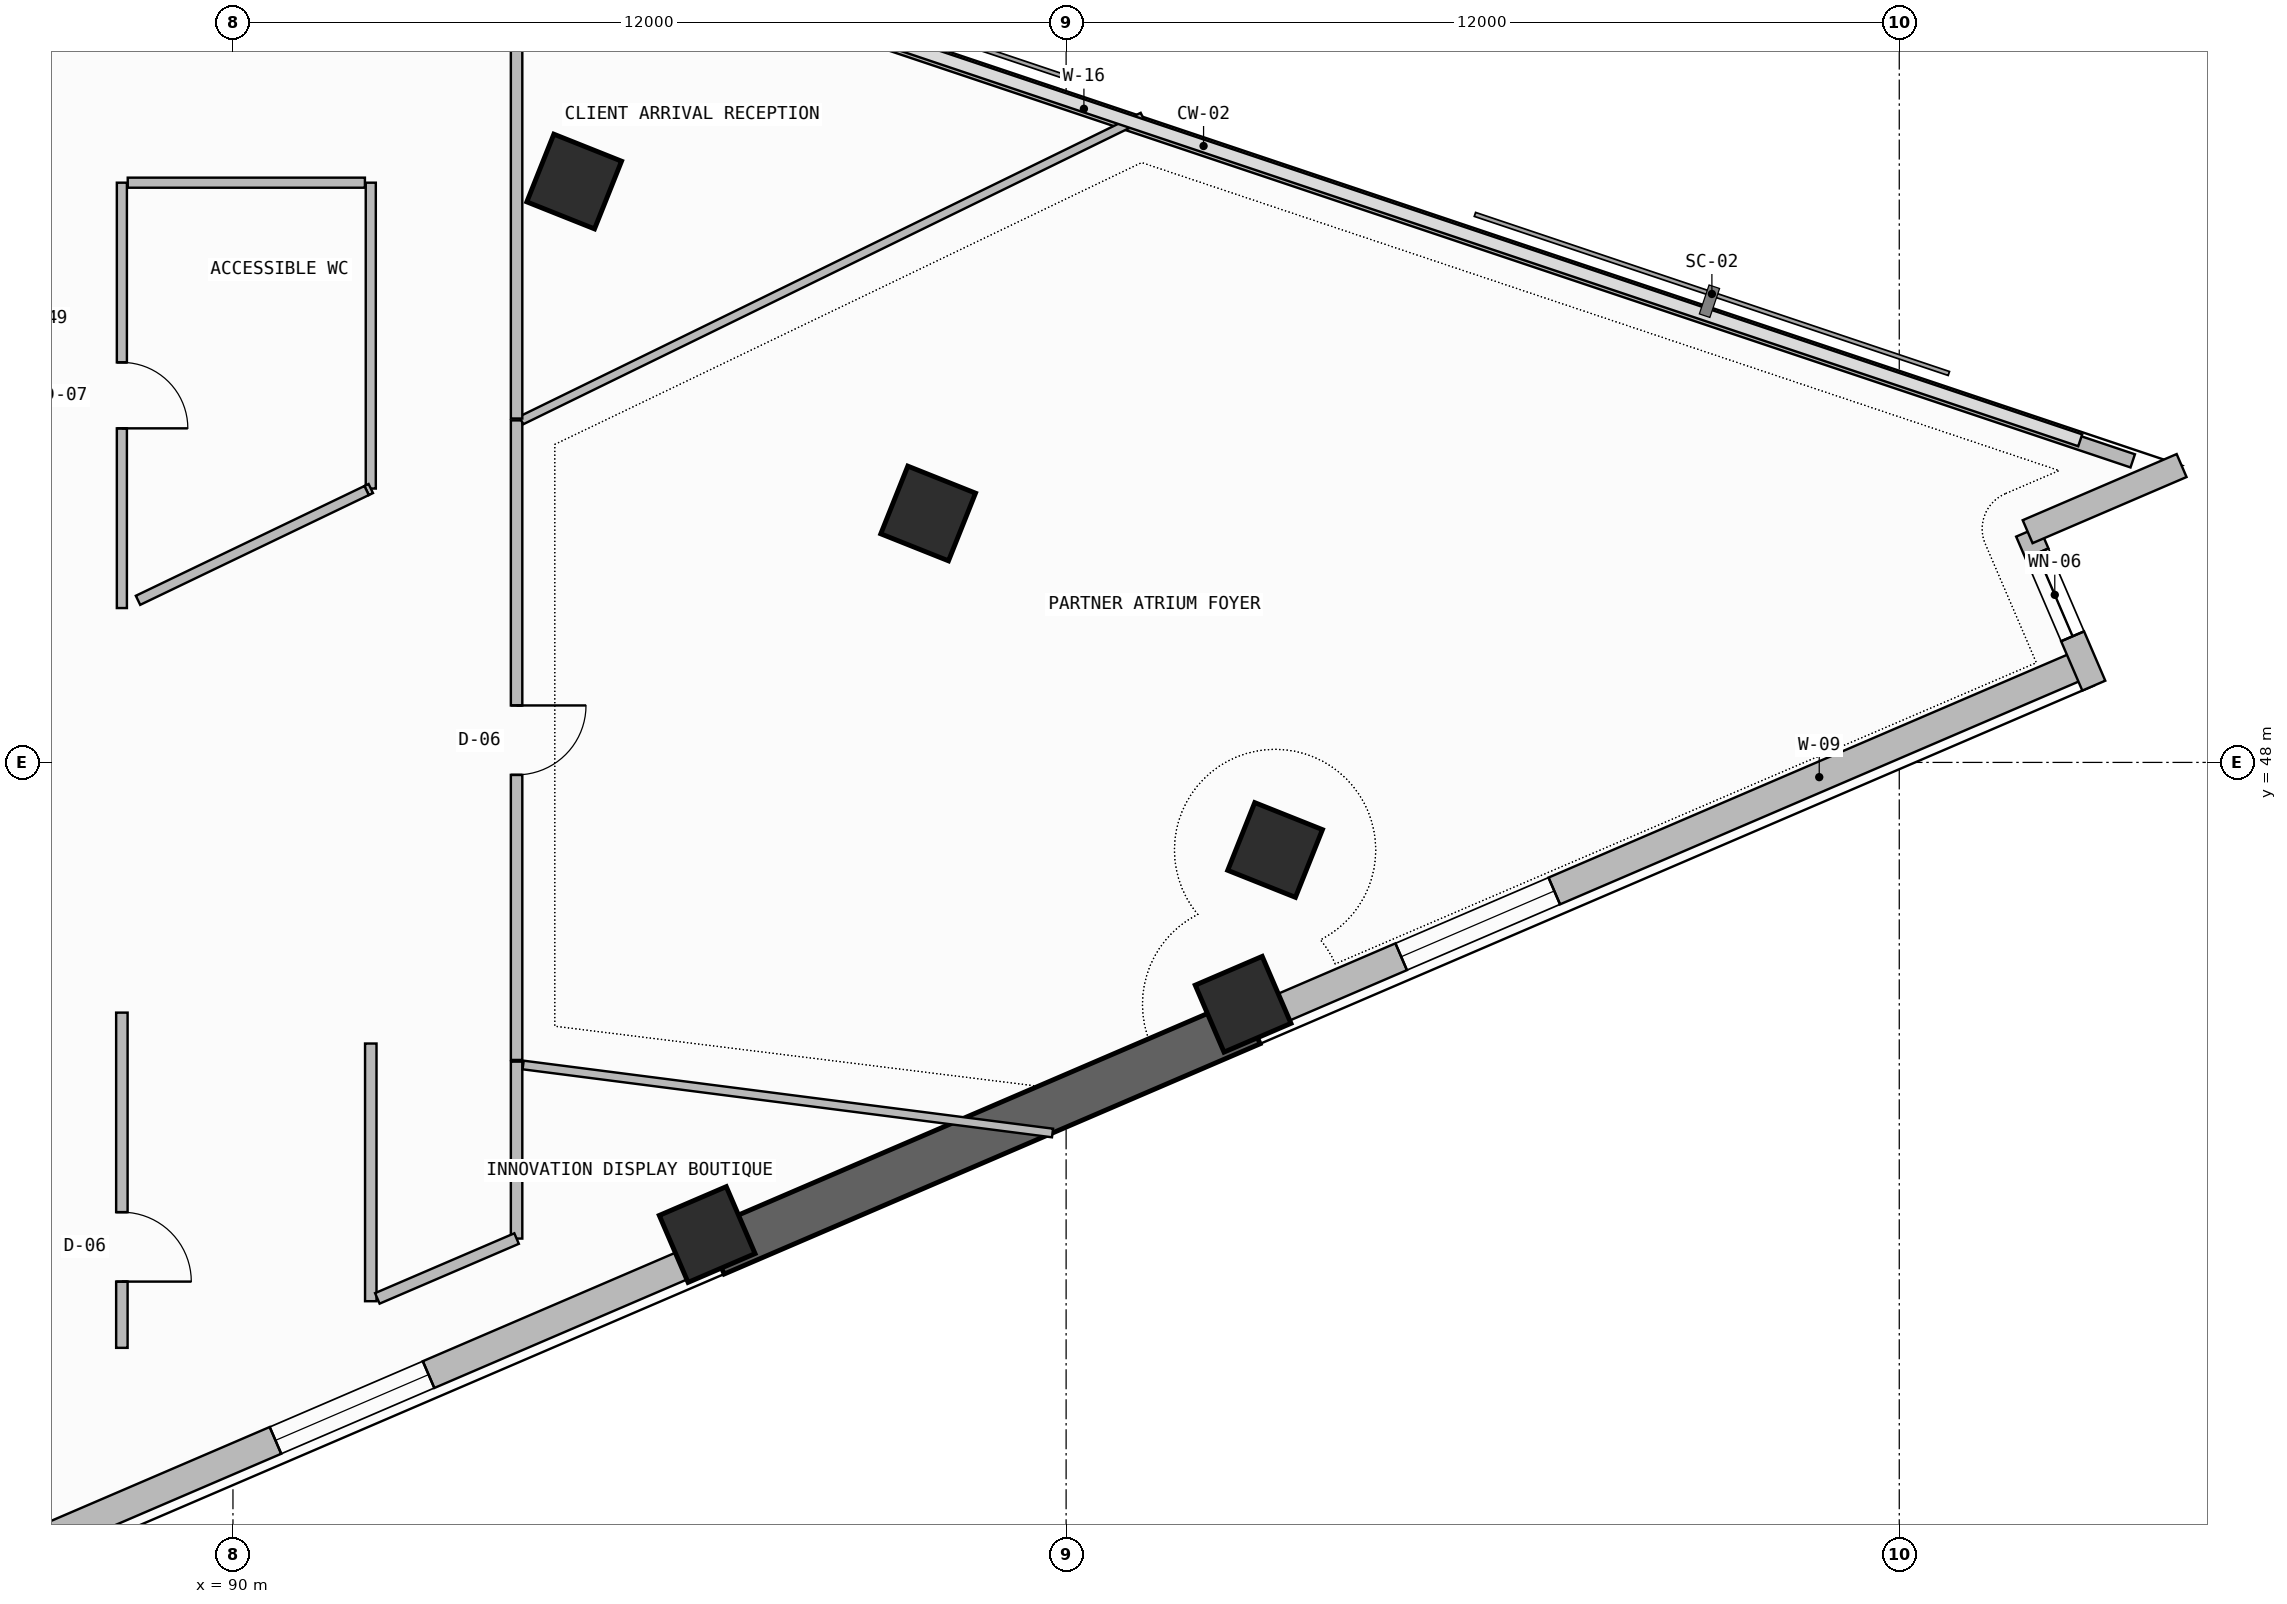
"""IFC4 building model, lengths in metres.
Left out: names, types, materials, properties, quantities, classifications, styles, units other than length and angle.
Written with IfcOpenShell. Run it as: python <this file> out.ifc"""

import sys

from ifc_helpers import new_model, si_unit, direction, frame, frame_2d, origin, origin_2d, place, context, subcontext, project, spatial, rectangle, extrude, element, fill, save


model = new_model("IFC4")
c1 = context("Model", 3, precision=1e-05, world=origin(), true_north=direction((0.0, 1.0)))
c2 = subcontext(c1, "Body", "Model", "MODEL_VIEW")
j1 = project(units=[si_unit("LENGTHUNIT", "METRE"), si_unit("PLANEANGLEUNIT", "RADIAN")], contexts=[c1])
p1 = place(None, origin())
s1 = spatial("IfcSite", under=j1, at=p1, CompositionType="ELEMENT")
p2 = place(p1, origin())
s2 = spatial("IfcBuilding", under=s1, at=p2, CompositionType="ELEMENT")
p3 = place(p2, frame((0.0, 0.0, 175.5)))
s3 = spatial("IfcBuildingStorey", under=s2, at=p3, CompositionType="ELEMENT", Elevation=175.5)
for number, where, z_axis, x_axis in (
    (1, (96.83, 41.2, 0.0), (0.0, 0.0, 1.0), (0.919, 0.395, 0.0)),
    (2, (104.549, 44.517, 0.0), (0.0, 0.0, 1.0), (0.919, 0.395, 0.0)),
    (3, (105.01, 46.739, 0.0), (0.0, 0.0, 1.0), (0.371, 0.929, 0.0)),
    (4, (100.013, 51.585, 0.0), (0.0, 0.0, 1.0), (0.371, 0.929, 0.0)),
    (5, (94.915, 56.367, 0.0), (0.0, 0.0, 1.0), (0.371, 0.929, 0.0)),
):
    element("IfcColumn", number, at=place(p3, frame(where, z_axis=z_axis, x_axis=x_axis)), inside=s3, PredefinedType="COLUMN", context=c2, shape_type="SweptSolid", body=[
        extrude(rectangle(XDim=1.05, YDim=1.05, at=origin_2d()), origin(), (0.0, 0.0, 1.0), 3.6),
    ])
p4 = place(p3, frame((86.1, 36.296, 0.0), z_axis=(0.0, 0.0, 1.0), x_axis=(0.918792412723, 0.394741057306, 0.0)))
e6 = element("IfcWall", 6, at=p4, inside=s3, PredefinedType="SOLIDWALL", context=c2, shape_type="SweptSolid", body=[
    extrude(rectangle(XDim=11.794, YDim=0.42, at=frame_2d((5.897, 0.0))), origin(), (0.0, 0.0, 1.0), 2.325),
])
p5 = place(p4, frame((4.911, 0.0, 1.2)))
e7 = element("IfcOpeningElement", 7, at=p5, cuts=e6, PredefinedType="OPENING", context=c2, shape_type="SweptSolid", body=[
    extrude(rectangle(XDim=2.4, YDim=0.9, at=frame_2d((1.2, 0.45))), frame((0.0, 0.22, 0.0), z_axis=(0.0, -1.0, 0.0), x_axis=(1.0, 0.0, 0.0)), (0.0, 0.0, 1.0), 0.44),
])
p6 = place(p3, frame((96.937, 40.952, -0.26), z_axis=(0.0, 0.0, 1.0), x_axis=(0.918782407933, 0.394764343468, 0.0)))
e8 = element("IfcWall", 8, at=p6, inside=s3, PredefinedType="SHEAR", context=c2, shape_type="SweptSolid", body=[
    extrude(rectangle(XDim=8.402, YDim=0.7, at=frame_2d((4.201, 0.0))), origin(), (0.0, 0.0, 1.0), 3.6),
])
p7 = place(p3, frame((104.656, 44.269, 0.0), z_axis=(0.0, 0.0, 1.0), x_axis=(0.918789071809, 0.394748833467, 0.0)))
e9 = element("IfcWall", 9, at=p7, inside=s3, PredefinedType="SOLIDWALL", context=c2, shape_type="SweptSolid", body=[
    extrude(rectangle(XDim=13.069, YDim=0.42, at=frame_2d((6.534, 0.0))), origin(), (0.0, 0.0, 1.0), 2.325),
])
p8 = place(p7, frame((2.362, 0.0, 1.2)))
e10 = element("IfcOpeningElement", 10, at=p8, cuts=e9, PredefinedType="OPENING", context=c2, shape_type="SweptSolid", body=[
    extrude(rectangle(XDim=2.4, YDim=0.9, at=frame_2d((1.2, 0.45))), frame((0.0, 0.22, 0.0), z_axis=(0.0, -1.0, 0.0), x_axis=(1.0, 0.0, 0.0)), (0.0, 0.0, 1.0), 0.44),
])
p9 = place(p3, frame((116.802, 49.106, 0.0), z_axis=(0.0, 0.0, 1.0), x_axis=(-0.394712707157, 0.918804592288, 0.0)))
e11 = element("IfcWall", 11, at=p9, inside=s3, PredefinedType="SOLIDWALL", context=c2, shape_type="SweptSolid", body=[
    extrude(rectangle(XDim=2.414, YDim=0.36, at=frame_2d((1.207, 0.0))), origin(), (0.0, 0.0, 1.0), 3.34),
])
p10 = place(p9, frame((0.773, 0.0, 0.45)))
e12 = element("IfcOpeningElement", 12, at=p10, cuts=e11, PredefinedType="OPENING", context=c2, shape_type="SweptSolid", body=[
    extrude(rectangle(XDim=1.3, YDim=2.4, at=frame_2d((0.65, 1.2))), frame((0.0, 0.19, 0.0), z_axis=(0.0, -1.0, 0.0), x_axis=(1.0, 0.0, 0.0)), (0.0, 0.0, 1.0), 0.38),
])
p11 = place(p3, frame((115.849, 51.323, 0.0), z_axis=(0.0, 0.0, 1.0), x_axis=(0.918788830096, 0.394749396062, 0.0)))
e13 = element("IfcWall", 13, at=p11, inside=s3, PredefinedType="SOLIDWALL", context=c2, shape_type="SweptSolid", body=[
    extrude(rectangle(XDim=2.413, YDim=0.36, at=frame_2d((1.207, 0.0))), origin(), (0.0, 0.0, 1.0), 3.34),
])
p12 = place(p3, frame((117.363, 52.344, 0.0), z_axis=(0.0, 0.0, 1.0), x_axis=(-0.94800468727, 0.31825636351, 0.0)))
e14 = element("IfcWall", 14, at=p12, inside=s3, PredefinedType="PARAPET", context=c2, shape_type="SweptSolid", body=[
    extrude(rectangle(XDim=31.869, YDim=0.2, at=frame_2d((15.935, 0.0))), origin(), (0.0, 0.0, 1.0), 1.15),
])
p13 = place(p3, frame((88.4, 39.568, 0.0), z_axis=(0.0, 0.0, 1.0), x_axis=(0.0, 1.0, 0.0)))
e15 = element("IfcWall", 15, at=p13, inside=s3, PredefinedType="PARTITIONING", context=c2, shape_type="SweptSolid", body=[
    extrude(rectangle(XDim=4.828, YDim=0.165, at=frame_2d((2.414, 0.0))), origin(), (0.0, 0.0, 1.0), 2.825),
])
p14 = place(p13, frame((0.954, 0.0, 0.0)))
e16 = element("IfcOpeningElement", 16, at=p14, cuts=e15, PredefinedType="OPENING", context=c2, shape_type="SweptSolid", body=[
    extrude(rectangle(XDim=1.0, YDim=2.2, at=frame_2d((0.5, 1.1))), frame((0.0, 0.093, 0.0), z_axis=(0.0, -1.0, 0.0), x_axis=(1.0, 0.0, 0.0)), (0.0, 0.0, 1.0), 0.185),
])
p15 = place(p3, frame((91.985, 43.951, 0.0), z_axis=(0.0, 0.0, 1.0), x_axis=(0.0, -1.0, 0.0)))
e17 = element("IfcWall", 17, at=p15, inside=s3, PredefinedType="PARTITIONING", context=c2, shape_type="SweptSolid", body=[
    extrude(rectangle(XDim=3.711, YDim=0.165, at=frame_2d((1.856, 0.0))), origin(), (0.0, 0.0, 1.0), 2.825),
])
p16 = place(p3, frame((94.085, 41.142, 0.0), z_axis=(0.0, 0.0, 1.0), x_axis=(0.0, 1.0, 0.0)))
e18 = element("IfcWall", 18, at=p16, inside=s3, PredefinedType="PARTITIONING", context=c2, shape_type="SweptSolid", body=[
    extrude(rectangle(XDim=2.548, YDim=0.165, at=frame_2d((1.274, 0.0))), origin(), (0.0, 0.0, 1.0), 2.825),
])
p17 = place(p3, frame((92.08, 40.28, 0.0), z_axis=(0.0, 0.0, 1.0), x_axis=(0.91875116165, 0.394837058756, 0.0)))
e19 = element("IfcWall", 19, at=p17, inside=s3, PredefinedType="PARTITIONING", context=c2, shape_type="SweptSolid", body=[
    extrude(rectangle(XDim=2.183, YDim=0.165, at=frame_2d((1.091, 0.0))), origin(), (0.0, 0.0, 1.0), 3.34),
])
p18 = place(p3, frame((94.179, 43.642, 0.0), z_axis=(0.0, 0.0, 1.0), x_axis=(0.991849484191, -0.127415072542, 0.0)))
e20 = element("IfcWall", 20, at=p18, inside=s3, PredefinedType="PARTITIONING", context=c2, shape_type="SweptSolid", body=[
    extrude(rectangle(XDim=7.688, YDim=0.125, at=frame_2d((3.844, 0.0))), origin(), (0.0, 0.0, 1.0), 2.325),
])
p19 = place(p3, frame((94.085, 43.714, 0.0), z_axis=(0.0, 0.0, 1.0), x_axis=(0.0, 1.0, 0.0)))
e21 = element("IfcWall", 21, at=p19, inside=s3, PredefinedType="PARTITIONING", context=c2, shape_type="SweptSolid", body=[
    extrude(rectangle(XDim=9.212, YDim=0.165, at=frame_2d((4.606, 0.0))), origin(), (0.0, 0.0, 1.0), 2.825),
])
p20 = place(p19, frame((4.106, 0.0, 0.0)))
e22 = element("IfcOpeningElement", 22, at=p20, cuts=e21, PredefinedType="OPENING", context=c2, shape_type="SweptSolid", body=[
    extrude(rectangle(XDim=1.0, YDim=2.2, at=frame_2d((0.5, 1.1))), frame((0.0, 0.093, 0.0), z_axis=(0.0, -1.0, 0.0), x_axis=(1.0, 0.0, 0.0)), (0.0, 0.0, 1.0), 0.185),
])
p21 = place(p3, frame((94.153, 52.927, 0.0), z_axis=(0.0, 0.0, 1.0), x_axis=(0.898440022674, 0.439096260127, 0.0)))
e23 = element("IfcWall", 23, at=p21, inside=s3, PredefinedType="PARTITIONING", context=c2, shape_type="SweptSolid", body=[
    extrude(rectangle(XDim=9.96, YDim=0.125, at=frame_2d((4.98, 0.0))), origin(), (0.0, 0.0, 1.0), 2.725),
])
p22 = place(p3, frame((88.4, 50.223, 0.0), z_axis=(0.0, 0.0, 1.0), x_axis=(0.0, 1.0, 0.0)))
e24 = element("IfcWall", 24, at=p22, inside=s3, PredefinedType="PARTITIONING", context=c2, shape_type="SweptSolid", body=[
    extrude(rectangle(XDim=6.127, YDim=0.145, at=frame_2d((3.063, 0.0))), origin(), (0.0, 0.0, 1.0), 2.825),
])
p23 = place(p22, frame((2.588, 0.0, 0.0)))
e25 = element("IfcOpeningElement", 25, at=p23, cuts=e24, PredefinedType="OPENING", context=c2, shape_type="SweptSolid", body=[
    extrude(rectangle(XDim=0.95, YDim=2.15, at=frame_2d((0.475, 1.075))), frame((0.0, 0.083, 0.0), z_axis=(0.0, -1.0, 0.0), x_axis=(1.0, 0.0, 0.0)), (0.0, 0.0, 1.0), 0.165),
])
p24 = place(p3, frame((91.985, 56.35, 0.0), z_axis=(0.0, 0.0, 1.0), x_axis=(0.0, -1.0, 0.0)))
e26 = element("IfcWall", 26, at=p24, inside=s3, PredefinedType="PARTITIONING", context=c2, shape_type="SweptSolid", body=[
    extrude(rectangle(XDim=4.406, YDim=0.145, at=frame_2d((2.203, 0.0))), origin(), (0.0, 0.0, 1.0), 2.825),
])
p25 = place(p3, frame((88.485, 56.35, 0.0), z_axis=(0.0, 0.0, 1.0), x_axis=(1.0, 0.0, 0.0)))
e27 = element("IfcWall", 27, at=p25, inside=s3, PredefinedType="PARTITIONING", context=c2, shape_type="SweptSolid", body=[
    extrude(rectangle(XDim=3.416, YDim=0.145, at=frame_2d((1.708, 0.0))), origin(), (0.0, 0.0, 1.0), 2.825),
])
p26 = place(p3, frame((91.985, 51.945, 0.0), z_axis=(0.0, 0.0, 1.0), x_axis=(-0.901637414301, -0.432492743445, 0.0)))
e28 = element("IfcWall", 28, at=p26, inside=s3, PredefinedType="PARTITIONING", context=c2, shape_type="SweptSolid", body=[
    extrude(rectangle(XDim=0.067, YDim=0.145, at=frame_2d((0.033, 0.0))), origin(), (0.0, 0.0, 1.0), 3.34),
])
p27 = place(p3, frame((94.085, 52.953, 0.0), z_axis=(0.0, 0.0, 1.0), x_axis=(0.0, 1.0, 0.0)))
e29 = element("IfcWall", 29, at=p27, inside=s3, PredefinedType="PARTITIONING", context=c2, shape_type="SweptSolid", body=[
    extrude(rectangle(XDim=5.88, YDim=0.165, at=frame_2d((2.94, 0.0))), origin(), (0.0, 0.0, 1.0), 2.725),
])
p28 = place(p3, frame((91.925, 51.916, 0.0), z_axis=(0.0, 0.0, 1.0), x_axis=(-0.901452116441, -0.432878830348, 0.0)))
e30 = element("IfcWall", 30, at=p28, inside=s3, PredefinedType="PARTITIONING", context=c2, shape_type="SweptSolid", body=[
    extrude(rectangle(XDim=3.652, YDim=0.145, at=frame_2d((1.826, 0.0))), origin(), (0.0, 0.0, 1.0), 2.925),
])
p29 = place(p5, origin())
e31 = element("IfcWindow", 31, at=p29, inside=s3, PartitioningType="SINGLE_PANEL", PredefinedType="WINDOW", context=c2, shape_type="SweptSolid", body=[
    extrude(rectangle(XDim=2.4, YDim=0.9, at=frame_2d((1.2, 0.45))), frame((0.0, 0.03, 0.0), z_axis=(0.0, -1.0, 0.0), x_axis=(1.0, 0.0, 0.0)), (0.0, 0.0, 1.0), 0.06),
])
fill(e7, e31)
p30 = place(p8, origin())
e32 = element("IfcWindow", 32, at=p30, inside=s3, PartitioningType="SINGLE_PANEL", PredefinedType="WINDOW", context=c2, shape_type="SweptSolid", body=[
    extrude(rectangle(XDim=2.4, YDim=0.9, at=frame_2d((1.2, 0.45))), frame((0.0, 0.03, 0.0), z_axis=(0.0, -1.0, 0.0), x_axis=(1.0, 0.0, 0.0)), (0.0, 0.0, 1.0), 0.06),
])
fill(e10, e32)
p31 = place(p10, origin())
e33 = element("IfcWindow", 33, at=p31, inside=s3, PartitioningType="SINGLE_PANEL", PredefinedType="WINDOW", context=c2, shape_type="SweptSolid", body=[
    extrude(rectangle(XDim=1.3, YDim=2.4, at=frame_2d((0.65, 1.2))), frame((0.0, 0.03, 0.0), z_axis=(0.0, -1.0, 0.0), x_axis=(1.0, 0.0, 0.0)), (0.0, 0.0, 1.0), 0.06),
])
fill(e12, e33)
p32 = place(p14, frame((1.0, 0.0, 0.0), z_axis=(0.0, 0.0, 1.0), x_axis=(-1.0, 0.0, 0.0)))
e34 = element("IfcDoor", 34, at=p32, inside=s3, OperationType="SINGLE_SWING_RIGHT", PredefinedType="DOOR", context=c2, shape_type="SweptSolid", body=[
    extrude(rectangle(XDim=1.0, YDim=2.2, at=frame_2d((0.5, 1.1))), frame((0.0, 0.025, 0.0), z_axis=(0.0, -1.0, 0.0), x_axis=(1.0, 0.0, 0.0)), (0.0, 0.0, 1.0), 0.05),
])
fill(e16, e34)
p33 = place(p20, frame((1.0, 0.0, 0.0), z_axis=(0.0, 0.0, 1.0), x_axis=(-1.0, 0.0, 0.0)))
e35 = element("IfcDoor", 35, at=p33, inside=s3, OperationType="SINGLE_SWING_LEFT", PredefinedType="DOOR", context=c2, shape_type="SweptSolid", body=[
    extrude(rectangle(XDim=1.0, YDim=2.2, at=frame_2d((0.5, 1.1))), frame((0.0, 0.025, 0.0), z_axis=(0.0, -1.0, 0.0), x_axis=(1.0, 0.0, 0.0)), (0.0, 0.0, 1.0), 0.05),
])
fill(e22, e35)
p34 = place(p23, frame((0.95, 0.0, 0.0), z_axis=(0.0, 0.0, 1.0), x_axis=(-1.0, 0.0, 0.0)))
e36 = element("IfcDoor", 36, at=p34, inside=s3, OperationType="SINGLE_SWING_RIGHT", PredefinedType="DOOR", context=c2, shape_type="SweptSolid", body=[
    extrude(rectangle(XDim=0.95, YDim=2.15, at=frame_2d((0.475, 1.075))), frame((0.0, 0.025, 0.0), z_axis=(0.0, -1.0, 0.0), x_axis=(1.0, 0.0, 0.0)), (0.0, 0.0, 1.0), 0.05),
])
fill(e25, e36)
save(model, sys.argv[1])
